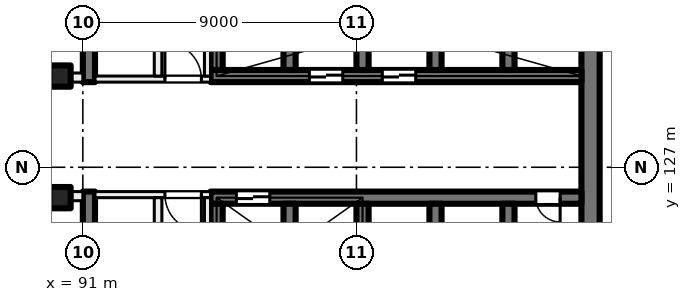
"""IFC4 building model, lengths in metres.
Left out: names, types, materials, properties, quantities, classifications, styles, units other than length and angle.
Written with IfcOpenShell. Run it as: python <this file> out.ifc"""

import sys

from ifc_helpers import new_model, si_unit, direction, frame, frame_2d, origin, origin_2d, place, context, subcontext, project, spatial, rectangle, extrude, element, fill, save


model = new_model("IFC4")
c1 = context("Model", 3, precision=1e-05, world=origin(), true_north=direction((0.0, 1.0)))
c2 = subcontext(c1, "Body", "Model", "MODEL_VIEW")
j1 = project(units=[si_unit("LENGTHUNIT", "METRE"), si_unit("PLANEANGLEUNIT", "RADIAN")], contexts=[c1])
p1 = place(None, origin())
s1 = spatial("IfcSite", under=j1, at=p1, CompositionType="ELEMENT")
p2 = place(p1, origin())
s2 = spatial("IfcBuilding", under=s1, at=p2, CompositionType="ELEMENT")
p3 = place(p2, frame((0.0, 0.0, 63.5)))
s3 = spatial("IfcBuildingStorey", under=s2, at=p3, CompositionType="ELEMENT", Elevation=63.5)
for number, where, z_axis, x_axis in (
    (1, (90.25, 130.0, 0.0), (0.0, 0.0, 1.0), (1.0, 0.0, 0.0)),
    (2, (90.25, 126.0, 0.0), (0.0, 0.0, 1.0), (1.0, 0.0, 0.0)),
):
    element("IfcColumn", number, at=place(p3, frame(where, z_axis=z_axis, x_axis=x_axis)), inside=s3, PredefinedType="COLUMN", context=c2, shape_type="SweptSolid", body=[
        extrude(rectangle(XDim=0.7, YDim=0.7, at=origin_2d()), origin(), (0.0, 0.0, 1.0), 4.0),
    ])
p4 = place(p3, frame((107.7, 135.2, 0.0), z_axis=(0.0, 0.0, 1.0), x_axis=(0.0, -1.0, 0.0)))
e3 = element("IfcWall", 3, at=p4, inside=s3, PredefinedType="SHEAR", context=c2, shape_type="SweptSolid", body=[
    extrude(rectangle(XDim=14.4, YDim=0.6, at=frame_2d((7.2, 0.0))), origin(), (0.0, 0.0, 1.0), 4.0),
])
p5 = place(p3, frame((107.4, 130.0, 0.0), z_axis=(0.0, 0.0, 1.0), x_axis=(-1.0, 0.0, 0.0)))
e4 = element("IfcWall", 4, at=p5, inside=s3, PredefinedType="SHEAR", context=c2, shape_type="SweptSolid", body=[
    extrude(rectangle(XDim=12.2, YDim=0.4, at=frame_2d((6.1, 0.0))), origin(), (0.0, 0.0, 1.0), 4.0),
])
p6 = place(p5, frame((5.45, 0.0, 0.0)))
e5 = element("IfcOpeningElement", 5, at=p6, cuts=e4, PredefinedType="OPENING", context=c2, shape_type="SweptSolid", body=[
    extrude(rectangle(XDim=1.1, YDim=2.1, at=frame_2d((0.55, 1.05))), frame((0.0, 0.21, 0.0), z_axis=(0.0, -1.0, 0.0), x_axis=(1.0, 0.0, 0.0)), (0.0, 0.0, 1.0), 0.42),
])
p7 = place(p5, frame((7.85, 0.0, 0.0)))
e6 = element("IfcOpeningElement", 6, at=p7, cuts=e4, PredefinedType="OPENING", context=c2, shape_type="SweptSolid", body=[
    extrude(rectangle(XDim=1.1, YDim=2.1, at=frame_2d((0.55, 1.05))), frame((0.0, 0.21, 0.0), z_axis=(0.0, -1.0, 0.0), x_axis=(1.0, 0.0, 0.0)), (0.0, 0.0, 1.0), 0.42),
])
for number, where, z_axis, x_axis in (
    (7, (105.0, 133.2, 0.0), (0.0, 0.0, 1.0), (0.0, -1.0, 0.0)),
    (8, (102.6, 133.2, 0.0), (0.0, 0.0, 1.0), (0.0, -1.0, 0.0)),
    (9, (100.2, 133.2, 0.0), (0.0, 0.0, 1.0), (0.0, -1.0, 0.0)),
    (10, (97.8, 133.2, 0.0), (0.0, 0.0, 1.0), (0.0, -1.0, 0.0)),
    (11, (95.4, 133.2, 0.0), (0.0, 0.0, 1.0), (0.0, -1.0, 0.0)),
):
    element("IfcWall", number, at=place(p3, frame(where, z_axis=z_axis, x_axis=x_axis)), inside=s3, PredefinedType="SHEAR", context=c2, shape_type="SweptSolid", body=[
        extrude(rectangle(XDim=3.0, YDim=0.4, at=frame_2d((1.5, 0.0))), origin(), (0.0, 0.0, 1.0), 4.0),
    ])
p8 = place(p3, frame((107.4, 126.0, 0.0), z_axis=(0.0, 0.0, 1.0), x_axis=(-1.0, 0.0, 0.0)))
e12 = element("IfcWall", 12, at=p8, inside=s3, PredefinedType="SHEAR", context=c2, shape_type="SweptSolid", body=[
    extrude(rectangle(XDim=12.2, YDim=0.4, at=frame_2d((6.1, 0.0))), origin(), (0.0, 0.0, 1.0), 4.0),
])
p9 = place(p8, frame((10.25, 0.0, 0.0)))
e13 = element("IfcOpeningElement", 13, at=p9, cuts=e12, PredefinedType="OPENING", context=c2, shape_type="SweptSolid", body=[
    extrude(rectangle(XDim=1.1, YDim=2.1, at=frame_2d((0.55, 1.05))), frame((0.0, 0.21, 0.0), z_axis=(0.0, -1.0, 0.0), x_axis=(1.0, 0.0, 0.0)), (0.0, 0.0, 1.0), 0.42),
])
p10 = place(p8, frame((0.7, 0.0, 0.0)))
e14 = element("IfcOpeningElement", 14, at=p10, cuts=e12, PredefinedType="OPENING", context=c2, shape_type="SweptSolid", body=[
    extrude(rectangle(XDim=0.8, YDim=2.1, at=frame_2d((0.4, 1.05))), frame((0.0, 0.21, 0.0), z_axis=(0.0, -1.0, 0.0), x_axis=(1.0, 0.0, 0.0)), (0.0, 0.0, 1.0), 0.42),
])
for number, where, z_axis, x_axis in (
    (15, (105.0, 125.8, 0.0), (0.0, 0.0, 1.0), (0.0, -1.0, 0.0)),
    (16, (102.6, 125.8, 0.0), (0.0, 0.0, 1.0), (0.0, -1.0, 0.0)),
    (17, (100.2, 125.8, 0.0), (0.0, 0.0, 1.0), (0.0, -1.0, 0.0)),
    (18, (97.8, 125.8, 0.0), (0.0, 0.0, 1.0), (0.0, -1.0, 0.0)),
    (19, (95.4, 125.8, 0.0), (0.0, 0.0, 1.0), (0.0, -1.0, 0.0)),
):
    element("IfcWall", number, at=place(p3, frame(where, z_axis=z_axis, x_axis=x_axis)), inside=s3, PredefinedType="SHEAR", context=c2, shape_type="SweptSolid", body=[
        extrude(rectangle(XDim=3.0, YDim=0.4, at=frame_2d((1.5, 0.0))), origin(), (0.0, 0.0, 1.0), 4.0),
    ])
for number, where, z_axis, x_axis in (
    (20, (91.2, 138.4, 0.0), (0.0, 0.0, 1.0), (0.0, -1.0, 0.0)),
    (21, (91.2, 126.2, 0.0), (0.0, 0.0, 1.0), (0.0, -1.0, 0.0)),
):
    element("IfcWall", number, at=place(p3, frame(where, z_axis=z_axis, x_axis=x_axis)), inside=s3, PredefinedType="SHEAR", context=c2, shape_type="SweptSolid", body=[
        extrude(rectangle(XDim=8.6, YDim=0.4, at=frame_2d((4.3, 0.0))), origin(), (0.0, 0.0, 1.0), 4.0),
    ])
p11 = place(p3, frame((95.2, 126.1, 0.0), z_axis=(0.0, 0.0, 1.0), x_axis=(-1.0, 0.0, 0.0)))
e22 = element("IfcWall", 22, at=p11, inside=s3, PredefinedType="PARTITIONING", context=c2, shape_type="SweptSolid", body=[
    extrude(rectangle(XDim=3.8, YDim=0.2, at=frame_2d((1.9, 0.0))), origin(), (0.0, 0.0, 1.0), 3.625),
])
p12 = place(p11, frame((0.3, 0.0, 0.0)))
e23 = element("IfcOpeningElement", 23, at=p12, cuts=e22, PredefinedType="OPENING", context=c2, shape_type="SweptSolid", body=[
    extrude(rectangle(XDim=1.2, YDim=2.1, at=frame_2d((0.6, 1.05))), frame((0.0, 0.11, 0.0), z_axis=(0.0, -1.0, 0.0), x_axis=(1.0, 0.0, 0.0)), (0.0, 0.0, 1.0), 0.22),
])
p13 = place(p3, frame((95.1, 117.6, 0.0), z_axis=(0.0, 0.0, 1.0), x_axis=(0.0, 1.0, 0.0)))
e24 = element("IfcWall", 24, at=p13, inside=s3, PredefinedType="PARTITIONING", context=c2, shape_type="SweptSolid", body=[
    extrude(rectangle(XDim=8.4, YDim=0.2, at=frame_2d((4.2, 0.0))), origin(), (0.0, 0.0, 1.0), 3.625),
])
p14 = place(p13, frame((1.65, 0.0, 0.0)))
e25 = element("IfcOpeningElement", 25, at=p14, cuts=e24, PredefinedType="OPENING", context=c2, shape_type="SweptSolid", body=[
    extrude(rectangle(XDim=1.5, YDim=2.1, at=frame_2d((0.75, 1.05))), frame((0.0, 0.11, 0.0), z_axis=(0.0, -1.0, 0.0), x_axis=(1.0, 0.0, 0.0)), (0.0, 0.0, 1.0), 0.22),
])
p15 = place(p3, frame((93.475, 117.6, 0.0), z_axis=(0.0, 0.0, 1.0), x_axis=(0.0, 1.0, 0.0)))
e26 = element("IfcWall", 26, at=p15, inside=s3, PredefinedType="PARTITIONING", context=c2, shape_type="SweptSolid", body=[
    extrude(rectangle(XDim=8.4, YDim=0.25, at=frame_2d((4.2, 0.0))), origin(), (0.0, 0.0, 1.0), 3.625),
])
p16 = place(p15, frame((5.125, 0.0, 0.0)))
e27 = element("IfcOpeningElement", 27, at=p16, cuts=e26, PredefinedType="OPENING", context=c2, shape_type="SweptSolid", body=[
    extrude(rectangle(XDim=1.0, YDim=2.1, at=frame_2d((0.5, 1.05))), frame((0.0, 0.135, 0.0), z_axis=(0.0, -1.0, 0.0), x_axis=(1.0, 0.0, 0.0)), (0.0, 0.0, 1.0), 0.27),
])
p17 = place(p15, frame((0.975, 0.0, 0.0)))
e28 = element("IfcOpeningElement", 28, at=p17, cuts=e26, PredefinedType="OPENING", context=c2, shape_type="SweptSolid", body=[
    extrude(rectangle(XDim=0.8, YDim=2.1, at=frame_2d((0.4, 1.05))), frame((0.0, 0.135, 0.0), z_axis=(0.0, -1.0, 0.0), x_axis=(1.0, 0.0, 0.0)), (0.0, 0.0, 1.0), 0.27),
])
p18 = place(p3, frame((91.4, 129.9, 0.0), z_axis=(0.0, 0.0, 1.0), x_axis=(1.0, 0.0, 0.0)))
e29 = element("IfcWall", 29, at=p18, inside=s3, PredefinedType="PARTITIONING", context=c2, shape_type="SweptSolid", body=[
    extrude(rectangle(XDim=3.8, YDim=0.2, at=frame_2d((1.9, 0.0))), origin(), (0.0, 0.0, 1.0), 3.625),
])
p19 = place(p18, frame((2.3, 0.0, 0.0)))
e30 = element("IfcOpeningElement", 30, at=p19, cuts=e29, PredefinedType="OPENING", context=c2, shape_type="SweptSolid", body=[
    extrude(rectangle(XDim=1.2, YDim=2.1, at=frame_2d((0.6, 1.05))), frame((0.0, 0.11, 0.0), z_axis=(0.0, -1.0, 0.0), x_axis=(1.0, 0.0, 0.0)), (0.0, 0.0, 1.0), 0.22),
])
p20 = place(p3, frame((95.1, 130.0, 0.0), z_axis=(0.0, 0.0, 1.0), x_axis=(0.0, 1.0, 0.0)))
e31 = element("IfcWall", 31, at=p20, inside=s3, PredefinedType="PARTITIONING", context=c2, shape_type="SweptSolid", body=[
    extrude(rectangle(XDim=8.4, YDim=0.2, at=frame_2d((4.2, 0.0))), origin(), (0.0, 0.0, 1.0), 3.625),
])
p21 = place(p20, frame((5.25, 0.0, 0.0)))
e32 = element("IfcOpeningElement", 32, at=p21, cuts=e31, PredefinedType="OPENING", context=c2, shape_type="SweptSolid", body=[
    extrude(rectangle(XDim=1.5, YDim=2.1, at=frame_2d((0.75, 1.05))), frame((0.0, 0.11, 0.0), z_axis=(0.0, -1.0, 0.0), x_axis=(1.0, 0.0, 0.0)), (0.0, 0.0, 1.0), 0.22),
])
p22 = place(p3, frame((93.475, 130.0, 0.0), z_axis=(0.0, 0.0, 1.0), x_axis=(0.0, 1.0, 0.0)))
e33 = element("IfcWall", 33, at=p22, inside=s3, PredefinedType="PARTITIONING", context=c2, shape_type="SweptSolid", body=[
    extrude(rectangle(XDim=8.4, YDim=0.25, at=frame_2d((4.2, 0.0))), origin(), (0.0, 0.0, 1.0), 3.625),
])
p23 = place(p22, frame((1.675, 0.0, 0.0)))
e34 = element("IfcOpeningElement", 34, at=p23, cuts=e33, PredefinedType="OPENING", context=c2, shape_type="SweptSolid", body=[
    extrude(rectangle(XDim=0.8, YDim=2.1, at=frame_2d((0.4, 1.05))), frame((0.0, 0.135, 0.0), z_axis=(0.0, -1.0, 0.0), x_axis=(1.0, 0.0, 0.0)), (0.0, 0.0, 1.0), 0.27),
])
p24 = place(p22, frame((5.825, 0.0, 0.0)))
e35 = element("IfcOpeningElement", 35, at=p24, cuts=e33, PredefinedType="OPENING", context=c2, shape_type="SweptSolid", body=[
    extrude(rectangle(XDim=1.0, YDim=2.1, at=frame_2d((0.5, 1.05))), frame((0.0, 0.135, 0.0), z_axis=(0.0, -1.0, 0.0), x_axis=(1.0, 0.0, 0.0)), (0.0, 0.0, 1.0), 0.27),
])
p25 = place(p3, frame((72.5, 129.95, 0.0), z_axis=(0.0, 0.0, 1.0), x_axis=(1.0, 0.0, 0.0)))
e36 = element("IfcWall", 36, at=p25, inside=s3, PredefinedType="PARTITIONING", context=c2, shape_type="SweptSolid", body=[
    extrude(rectangle(XDim=18.5, YDim=0.3, at=frame_2d((9.25, 0.0))), origin(), (0.0, 0.0, 1.0), 3.625),
])
p26 = place(p25, frame((6.0, 0.0, 0.0)))
e37 = element("IfcOpeningElement", 37, at=p26, cuts=e36, PredefinedType="OPENING", context=c2, shape_type="SweptSolid", body=[
    extrude(rectangle(XDim=1.0, YDim=2.1, at=frame_2d((0.5, 1.05))), frame((0.0, 0.16, 0.0), z_axis=(0.0, -1.0, 0.0), x_axis=(1.0, 0.0, 0.0)), (0.0, 0.0, 1.0), 0.32),
])
p27 = place(p25, frame((1.225, 0.0, 0.0)))
e38 = element("IfcOpeningElement", 38, at=p27, cuts=e36, PredefinedType="OPENING", context=c2, shape_type="SweptSolid", body=[
    extrude(rectangle(XDim=1.8, YDim=2.1, at=frame_2d((0.9, 1.05))), frame((0.0, 0.16, 0.0), z_axis=(0.0, -1.0, 0.0), x_axis=(1.0, 0.0, 0.0)), (0.0, 0.0, 1.0), 0.32),
])
p28 = place(p3, frame((91.0, 126.05, 0.0), z_axis=(0.0, 0.0, 1.0), x_axis=(-1.0, 0.0, 0.0)))
e39 = element("IfcWall", 39, at=p28, inside=s3, PredefinedType="PARTITIONING", context=c2, shape_type="SweptSolid", body=[
    extrude(rectangle(XDim=43.785, YDim=0.3, at=frame_2d((21.893, 0.0))), origin(), (0.0, 0.0, 1.0), 3.625),
])
p29 = place(p28, frame((4.375, 0.0, 0.0)))
e40 = element("IfcOpeningElement", 40, at=p29, cuts=e39, PredefinedType="OPENING", context=c2, shape_type="SweptSolid", body=[
    extrude(rectangle(XDim=1.0, YDim=2.1, at=frame_2d((0.5, 1.05))), frame((0.0, 0.16, 0.0), z_axis=(0.0, -1.0, 0.0), x_axis=(1.0, 0.0, 0.0)), (0.0, 0.0, 1.0), 0.32),
])
p30 = place(p28, frame((15.0, 0.0, 0.0)))
e41 = element("IfcOpeningElement", 41, at=p30, cuts=e39, PredefinedType="OPENING", context=c2, shape_type="SweptSolid", body=[
    extrude(rectangle(XDim=1.0, YDim=2.1, at=frame_2d((0.5, 1.05))), frame((0.0, 0.16, 0.0), z_axis=(0.0, -1.0, 0.0), x_axis=(1.0, 0.0, 0.0)), (0.0, 0.0, 1.0), 0.32),
])
p31 = place(p28, frame((34.0, 0.0, 0.0)))
e42 = element("IfcOpeningElement", 42, at=p31, cuts=e39, PredefinedType="OPENING", context=c2, shape_type="SweptSolid", body=[
    extrude(rectangle(XDim=1.0, YDim=2.1, at=frame_2d((0.5, 1.05))), frame((0.0, 0.16, 0.0), z_axis=(0.0, -1.0, 0.0), x_axis=(1.0, 0.0, 0.0)), (0.0, 0.0, 1.0), 0.32),
])
p32 = place(p28, frame((39.296, 0.0, 0.0)))
e43 = element("IfcOpeningElement", 43, at=p32, cuts=e39, PredefinedType="OPENING", context=c2, shape_type="SweptSolid", body=[
    extrude(rectangle(XDim=1.8, YDim=2.1, at=frame_2d((0.9, 1.05))), frame((0.0, 0.16, 0.0), z_axis=(0.0, -1.0, 0.0), x_axis=(1.0, 0.0, 0.0)), (0.0, 0.0, 1.0), 0.32),
])
p33 = place(p9, origin())
e44 = element("IfcDoor", 44, at=p33, inside=s3, OperationType="DOUBLE_DOOR_SLIDING", PredefinedType="DOOR", context=c2, shape_type="SweptSolid", body=[
    extrude(rectangle(XDim=1.1, YDim=2.1, at=frame_2d((0.55, 1.05))), frame((0.0, 0.025, 0.0), z_axis=(0.0, -1.0, 0.0), x_axis=(1.0, 0.0, 0.0)), (0.0, 0.0, 1.0), 0.05),
])
fill(e13, e44)
p34 = place(p6, origin())
e45 = element("IfcDoor", 45, at=p34, inside=s3, OperationType="DOUBLE_DOOR_SLIDING", PredefinedType="DOOR", context=c2, shape_type="SweptSolid", body=[
    extrude(rectangle(XDim=1.1, YDim=2.1, at=frame_2d((0.55, 1.05))), frame((0.0, 0.025, 0.0), z_axis=(0.0, -1.0, 0.0), x_axis=(1.0, 0.0, 0.0)), (0.0, 0.0, 1.0), 0.05),
])
fill(e5, e45)
p35 = place(p7, origin())
e46 = element("IfcDoor", 46, at=p35, inside=s3, OperationType="DOUBLE_DOOR_SLIDING", PredefinedType="DOOR", context=c2, shape_type="SweptSolid", body=[
    extrude(rectangle(XDim=1.1, YDim=2.1, at=frame_2d((0.55, 1.05))), frame((0.0, 0.025, 0.0), z_axis=(0.0, -1.0, 0.0), x_axis=(1.0, 0.0, 0.0)), (0.0, 0.0, 1.0), 0.05),
])
fill(e6, e46)
p36 = place(p10, origin())
e47 = element("IfcDoor", 47, at=p36, inside=s3, OperationType="SINGLE_SWING_LEFT", PredefinedType="DOOR", context=c2, shape_type="SweptSolid", body=[
    extrude(rectangle(XDim=0.8, YDim=2.1, at=frame_2d((0.4, 1.05))), frame((0.0, 0.025, 0.0), z_axis=(0.0, -1.0, 0.0), x_axis=(1.0, 0.0, 0.0)), (0.0, 0.0, 1.0), 0.05),
])
fill(e14, e47)
p37 = place(p12, origin())
e48 = element("IfcDoor", 48, at=p37, inside=s3, OperationType="DOUBLE_DOOR_SINGLE_SWING", PredefinedType="DOOR", context=c2, shape_type="SweptSolid", body=[
    extrude(rectangle(XDim=1.2, YDim=2.1, at=frame_2d((0.6, 1.05))), frame((0.0, 0.025, 0.0), z_axis=(0.0, -1.0, 0.0), x_axis=(1.0, 0.0, 0.0)), (0.0, 0.0, 1.0), 0.05),
])
fill(e23, e48)
p38 = place(p19, origin())
e49 = element("IfcDoor", 49, at=p38, inside=s3, OperationType="DOUBLE_DOOR_SINGLE_SWING", PredefinedType="DOOR", context=c2, shape_type="SweptSolid", body=[
    extrude(rectangle(XDim=1.2, YDim=2.1, at=frame_2d((0.6, 1.05))), frame((0.0, 0.025, 0.0), z_axis=(0.0, -1.0, 0.0), x_axis=(1.0, 0.0, 0.0)), (0.0, 0.0, 1.0), 0.05),
])
fill(e30, e49)
save(model, sys.argv[1])
